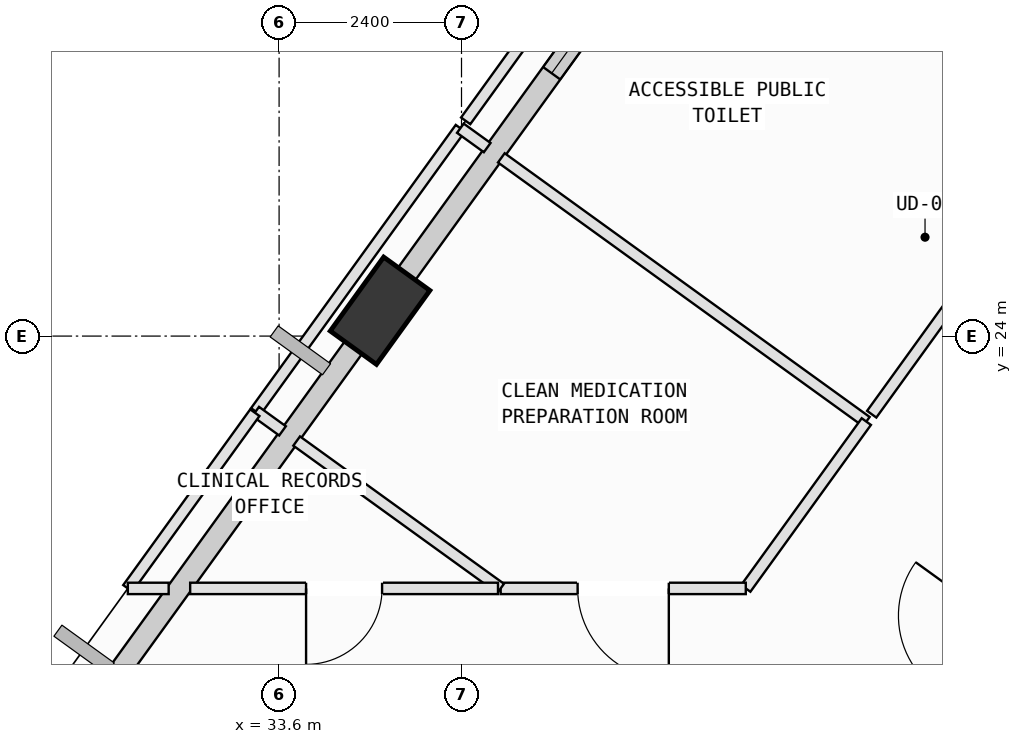
"""IFC4 building model, lengths in metres.
Left out: names, types, materials, properties, quantities, classifications, styles, units other than length and angle.
Written with IfcOpenShell. Run it as: python <this file> out.ifc"""

import sys

from ifc_helpers import new_model, si_unit, direction, frame, frame_2d, origin, origin_2d, place, context, subcontext, project, spatial, rectangle, extrude, element, fill, save


model = new_model("IFC4")
c1 = context("Model", 3, precision=1e-05, world=origin(), true_north=direction((0.0, 1.0)))
c2 = subcontext(c1, "Body", "Model", "MODEL_VIEW")
j1 = project(units=[si_unit("LENGTHUNIT", "METRE"), si_unit("PLANEANGLEUNIT", "RADIAN")], contexts=[c1])
p1 = place(None, origin())
s1 = spatial("IfcSite", under=j1, at=p1, CompositionType="ELEMENT")
p2 = place(p1, origin())
s2 = spatial("IfcBuilding", under=s1, at=p2, CompositionType="ELEMENT")
p3 = place(p2, frame((0.0, 0.0, 255.2)))
s3 = spatial("IfcBuildingStorey", under=s2, at=p3, CompositionType="ELEMENT", Elevation=255.2)
p4 = place(p3, frame((34.928, 24.333, 0.002), z_axis=(0.001893791031, 0.005559193026, 0.999982754316), x_axis=(-0.815748535883, -0.578387124425, 0.004760305024)))
e1 = element("IfcColumn", 1, at=p4, inside=s3, PredefinedType="COLUMN", context=c2, shape_type="SweptSolid", body=[
    extrude(rectangle(XDim=1.2, YDim=0.75, at=origin_2d()), origin(), (0.0, 0.0, 1.0), 3.996),
])
p5 = place(p3, frame((35.168, 24.665, 0.0), z_axis=(0.0, 0.0, 1.0), x_axis=(0.585643524066, 0.810568727943, 0.0)))
e2 = element("IfcWall", 2, at=p5, inside=s3, PredefinedType="SOLIDWALL", context=c2, shape_type="SweptSolid", body=[
    extrude(rectangle(XDim=6.409, YDim=0.28, at=frame_2d((3.205, 0.0))), origin(), (0.0, 0.0, 1.0), 3.265),
])
p6 = place(p5, frame((3.447, 0.0, 0.75)))
e3 = element("IfcOpeningElement", 3, at=p6, cuts=e2, PredefinedType="OPENING", context=c2, shape_type="SweptSolid", body=[
    extrude(rectangle(XDim=2.0, YDim=1.95, at=frame_2d((1.0, 0.975))), frame((0.0, 0.15, 0.0), z_axis=(0.0, -1.0, 0.0), x_axis=(1.0, 0.0, 0.0)), (0.0, 0.0, 1.0), 0.3),
])
p7 = place(p3, frame((31.096, 19.029, 0.0), z_axis=(0.0, 0.0, 1.0), x_axis=(0.585632397532, 0.810576766852, 0.0)))
e4 = element("IfcWall", 4, at=p7, inside=s3, PredefinedType="SOLIDWALL", context=c2, shape_type="SweptSolid", body=[
    extrude(rectangle(XDim=6.158, YDim=0.28, at=frame_2d((3.079, 0.0))), origin(), (0.0, 0.0, 1.0), 3.265),
])
p8 = place(p3, frame((24.94, 22.976, 0.0), z_axis=(0.0, 0.0, 1.0), x_axis=(0.81054690161, -0.585673731945, 0.0)))
e5 = element("IfcWall", 5, at=p8, inside=s3, PredefinedType="SOLIDWALL", context=c2, shape_type="SweptSolid", body=[
    extrude(rectangle(XDim=6.958, YDim=0.28, at=frame_2d((3.479, 0.0))), origin(), (0.0, 0.0, 1.0), 3.165),
])
p9 = place(p3, frame((41.326, 18.076, 0.0), z_axis=(0.0, 0.0, 1.0), x_axis=(0.585667160303, 0.810551650016, 0.0)))
e6 = element("IfcWall", 6, at=p9, inside=s3, PredefinedType="PARTITIONING", context=c2, shape_type="SweptSolid", body=[
    extrude(rectangle(XDim=4.34, YDim=0.15, at=frame_2d((2.17, 0.0))), origin(), (0.0, 0.0, 1.0), 3.78),
])
p10 = place(p9, frame((1.57, 0.0, 0.0)))
e7 = element("IfcOpeningElement", 7, at=p10, cuts=e6, PredefinedType="OPENING", context=c2, shape_type="SweptSolid", body=[
    extrude(rectangle(XDim=1.2, YDim=2.15, at=frame_2d((0.6, 1.075))), frame((0.0, 0.085, 0.0), z_axis=(0.0, -1.0, 0.0), x_axis=(1.0, 0.0, 0.0)), (0.0, 0.0, 1.0), 0.17),
])
p11 = place(p3, frame((33.292, 23.008, 0.0), z_axis=(0.0, 0.0, 1.0), x_axis=(0.585684390919, 0.81053919969, 0.0)))
e8 = element("IfcWall", 8, at=p11, inside=s3, PredefinedType="PARTITIONING", context=c2, shape_type="SweptSolid", body=[
    extrude(rectangle(XDim=4.598, YDim=0.15, at=frame_2d((2.299, 0.0))), origin(), (0.0, 0.0, 1.0), 3.78),
])
p12 = place(p3, frame((35.985, 26.735, 0.0), z_axis=(0.0, 0.0, 1.0), x_axis=(0.810309392331, -0.586002294108, 0.0)))
e9 = element("IfcWall", 9, at=p12, inside=s3, PredefinedType="PARTITIONING", context=c2, shape_type="SweptSolid", body=[
    extrude(rectangle(XDim=0.435, YDim=0.15, at=frame_2d((0.218, 0.0))), origin(), (0.0, 0.0, 1.0), 3.78),
])
p13 = place(p3, frame((36.524, 26.345, 0.0), z_axis=(0.0, 0.0, 1.0), x_axis=(0.81053033329, -0.585696661094, 0.0)))
e10 = element("IfcWall", 10, at=p13, inside=s3, PredefinedType="PARTITIONING", context=c2, shape_type="SweptSolid", body=[
    extrude(rectangle(XDim=5.925, YDim=0.15, at=frame_2d((2.962, 0.0))), origin(), (0.0, 0.0, 1.0), 3.78),
])
p14 = place(p3, frame((41.326, 22.875, 0.0), z_axis=(0.0, 0.0, 1.0), x_axis=(-0.585638666842, -0.810572237311, 0.0)))
e11 = element("IfcWall", 11, at=p14, inside=s3, PredefinedType="PARTITIONING", context=c2, shape_type="SweptSolid", body=[
    extrude(rectangle(XDim=2.708, YDim=0.15, at=frame_2d((1.354, 0.0))), origin(), (0.0, 0.0, 1.0), 3.78),
])
p15 = place(p3, frame((39.74, 20.68, 0.0), z_axis=(0.0, 0.0, 1.0), x_axis=(-1.0, 0.0, 0.0)))
e12 = element("IfcWall", 12, at=p15, inside=s3, PredefinedType="PARTITIONING", context=c2, shape_type="SweptSolid", body=[
    extrude(rectangle(XDim=3.225, YDim=0.15, at=frame_2d((1.613, 0.0))), origin(), (0.0, 0.0, 1.0), 3.415),
])
p16 = place(p15, frame((1.012, 0.0, 0.0)))
e13 = element("IfcOpeningElement", 13, at=p16, cuts=e12, PredefinedType="OPENING", context=c2, shape_type="SweptSolid", body=[
    extrude(rectangle(XDim=1.2, YDim=2.15, at=frame_2d((0.6, 1.075))), frame((0.0, 0.085, 0.0), z_axis=(0.0, -1.0, 0.0), x_axis=(1.0, 0.0, 0.0)), (0.0, 0.0, 1.0), 0.17),
])
p17 = place(p3, frame((36.515, 20.68, 0.0), z_axis=(0.0, 0.0, 1.0), x_axis=(-0.810587832846, 0.58561708073, 0.0)))
e14 = element("IfcWall", 14, at=p17, inside=s3, PredefinedType="PARTITIONING", context=c2, shape_type="SweptSolid", body=[
    extrude(rectangle(XDim=3.311, YDim=0.15, at=frame_2d((1.656, 0.0))), origin(), (0.0, 0.0, 1.0), 3.78),
])
p18 = place(p3, frame((33.645, 22.753, 0.0), z_axis=(0.0, 0.0, 1.0), x_axis=(-0.810501828057, 0.585736106721, 0.0)))
e15 = element("IfcWall", 15, at=p18, inside=s3, PredefinedType="PARTITIONING", context=c2, shape_type="SweptSolid", body=[
    extrude(rectangle(XDim=0.436, YDim=0.15, at=frame_2d((0.218, 0.0))), origin(), (0.0, 0.0, 1.0), 3.78),
])
p19 = place(p3, frame((44.089, 26.699, 0.0), z_axis=(0.0, 0.0, 1.0), x_axis=(-0.585544838351, -0.810640020157, 0.0)))
e16 = element("IfcWall", 16, at=p19, inside=s3, PredefinedType="PARTITIONING", context=c2, shape_type="SweptSolid", body=[
    extrude(rectangle(XDim=4.598, YDim=0.15, at=frame_2d((2.299, 0.0))), origin(), (0.0, 0.0, 1.0), 3.78),
])
p20 = place(p19, frame((1.839, 0.0, 0.0)))
e17 = element("IfcOpeningElement", 17, at=p20, cuts=e16, PredefinedType="OPENING", context=c2, shape_type="SweptSolid", body=[
    extrude(rectangle(XDim=0.92, YDim=2.1, at=frame_2d((0.46, 1.05))), frame((0.0, 0.085, 0.0), z_axis=(0.0, -1.0, 0.0), x_axis=(1.0, 0.0, 0.0)), (0.0, 0.0, 1.0), 0.17),
])
p21 = place(p3, frame((36.055, 26.832, 0.0), z_axis=(0.0, 0.0, 1.0), x_axis=(0.585684390919, 0.81053919969, 0.0)))
e18 = element("IfcWall", 18, at=p21, inside=s3, PredefinedType="PARTITIONING", context=c2, shape_type="SweptSolid", body=[
    extrude(rectangle(XDim=4.598, YDim=0.15, at=frame_2d((2.299, 0.0))), origin(), (0.0, 0.0, 1.0), 3.265),
])
p22 = place(p3, frame((38.748, 30.559, 0.0), z_axis=(0.0, 0.0, 1.0), x_axis=(0.810486733326, -0.585756993217, 0.0)))
e19 = element("IfcWall", 19, at=p22, inside=s3, PredefinedType="PARTITIONING", context=c2, shape_type="SweptSolid", body=[
    extrude(rectangle(XDim=6.59, YDim=0.15, at=frame_2d((3.295, 0.0))), origin(), (0.0, 0.0, 1.0), 3.78),
])
p23 = place(p3, frame((31.61, 20.68, 0.0), z_axis=(0.0, 0.0, 1.0), x_axis=(0.585746760118, 0.810494128918, 0.0)))
e20 = element("IfcWall", 20, at=p23, inside=s3, PredefinedType="PARTITIONING", context=c2, shape_type="SweptSolid", body=[
    extrude(rectangle(XDim=2.853, YDim=0.15, at=frame_2d((1.426, 0.0))), origin(), (0.0, 0.0, 1.0), 3.78),
])
p24 = place(p3, frame((36.48, 20.68, 0.0), z_axis=(0.0, 0.0, 1.0), x_axis=(-1.0, 0.0, 0.0)))
e21 = element("IfcWall", 21, at=p24, inside=s3, PredefinedType="PARTITIONING", context=c2, shape_type="SweptSolid", body=[
    extrude(rectangle(XDim=4.05, YDim=0.15, at=frame_2d((2.025, 0.0))), origin(), (0.0, 0.0, 1.0), 3.415),
])
p25 = place(p24, frame((1.525, 0.0, 0.0)))
e22 = element("IfcOpeningElement", 22, at=p25, cuts=e21, PredefinedType="OPENING", context=c2, shape_type="SweptSolid", body=[
    extrude(rectangle(XDim=1.0, YDim=2.12, at=frame_2d((0.5, 1.06))), frame((0.0, 0.085, 0.0), z_axis=(0.0, -1.0, 0.0), x_axis=(1.0, 0.0, 0.0)), (0.0, 0.0, 1.0), 0.17),
])
p26 = place(p3, frame((32.147, 20.68, 0.0), z_axis=(0.0, 0.0, 1.0), x_axis=(-1.0, 0.0, 0.0)))
e23 = element("IfcWall", 23, at=p26, inside=s3, PredefinedType="PARTITIONING", context=c2, shape_type="SweptSolid", body=[
    extrude(rectangle(XDim=0.537, YDim=0.15, at=frame_2d((0.269, 0.0))), origin(), (0.0, 0.0, 1.0), 3.78),
])
p27 = place(p6, origin())
e24 = element("IfcWindow", 24, at=p27, inside=s3, PartitioningType="SINGLE_PANEL", PredefinedType="WINDOW", context=c2, shape_type="SweptSolid", body=[
    extrude(rectangle(XDim=2.0, YDim=1.95, at=frame_2d((1.0, 0.975))), frame((0.0, 0.03, 0.0), z_axis=(0.0, -1.0, 0.0), x_axis=(1.0, 0.0, 0.0)), (0.0, 0.0, 1.0), 0.06),
])
fill(e3, e24)
p28 = place(p10, origin())
e25 = element("IfcDoor", 25, at=p28, inside=s3, OperationType="SINGLE_SWING_RIGHT", PredefinedType="DOOR", context=c2, shape_type="SweptSolid", body=[
    extrude(rectangle(XDim=1.2, YDim=2.15, at=frame_2d((0.6, 1.075))), frame((0.0, 0.025, 0.0), z_axis=(0.0, -1.0, 0.0), x_axis=(1.0, 0.0, 0.0)), (0.0, 0.0, 1.0), 0.05),
])
fill(e7, e25)
p29 = place(p16, origin())
e26 = element("IfcDoor", 26, at=p29, inside=s3, OperationType="SINGLE_SWING_LEFT", PredefinedType="DOOR", context=c2, shape_type="SweptSolid", body=[
    extrude(rectangle(XDim=1.2, YDim=2.15, at=frame_2d((0.6, 1.075))), frame((0.0, 0.025, 0.0), z_axis=(0.0, -1.0, 0.0), x_axis=(1.0, 0.0, 0.0)), (0.0, 0.0, 1.0), 0.05),
])
fill(e13, e26)
p30 = place(p25, origin())
e27 = element("IfcDoor", 27, at=p30, inside=s3, OperationType="SINGLE_SWING_RIGHT", PredefinedType="DOOR", context=c2, shape_type="SweptSolid", body=[
    extrude(rectangle(XDim=1.0, YDim=2.12, at=frame_2d((0.5, 1.06))), frame((0.0, 0.025, 0.0), z_axis=(0.0, -1.0, 0.0), x_axis=(1.0, 0.0, 0.0)), (0.0, 0.0, 1.0), 0.05),
])
fill(e22, e27)
save(model, sys.argv[1])
